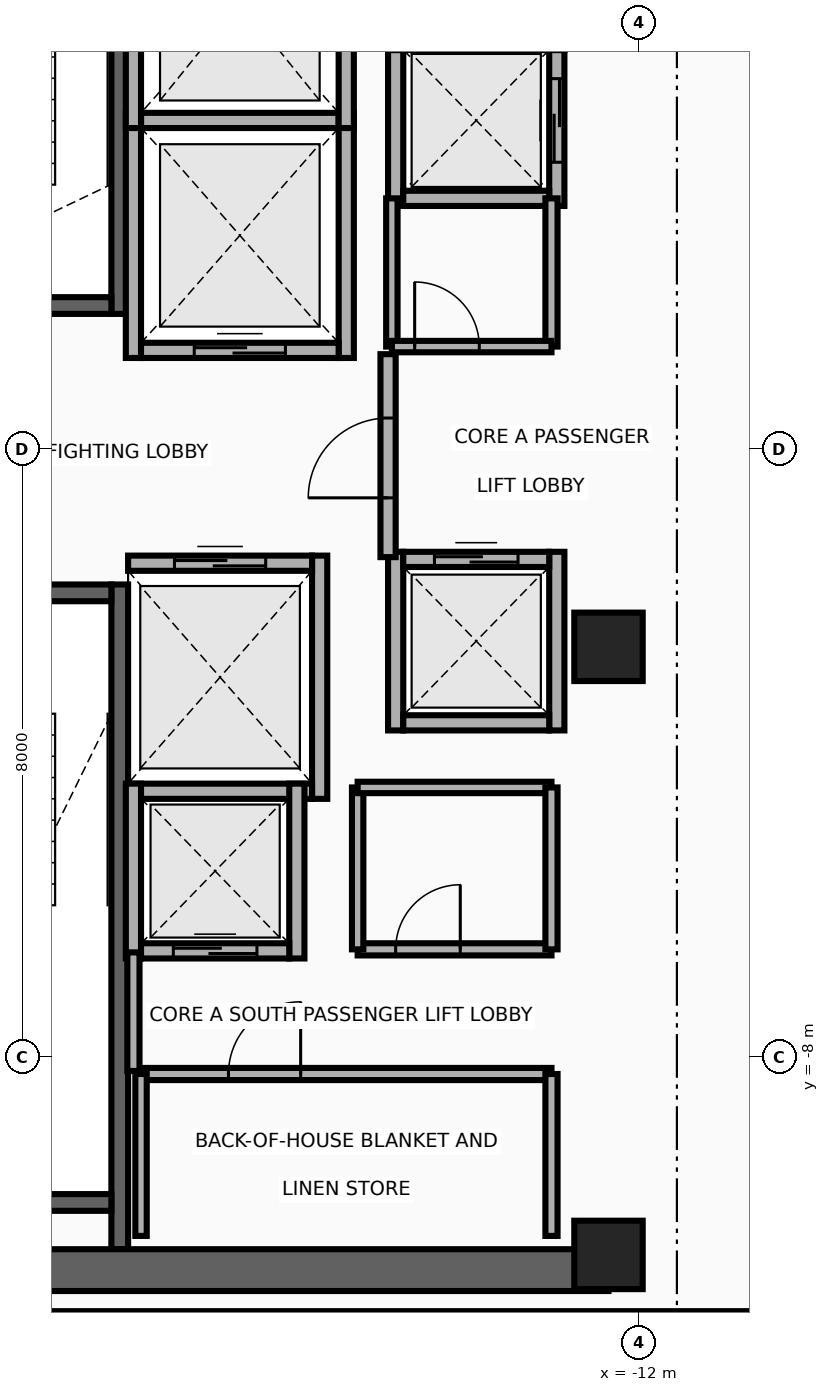
"""IFC4 building model, lengths in metres.
Left out: names, types, materials, properties, quantities, classifications, styles, units other than length and angle.
Written with IfcOpenShell. Run it as: python <this file> out.ifc"""

import sys

from ifc_helpers import new_model, si_unit, direction, frame, frame_2d, origin, origin_2d, place, context, subcontext, project, spatial, rectangle, extrude, source, transform, mapped, element, fill, save


model = new_model("IFC4")
c1 = context("Model", 3, precision=1e-05, world=origin(), true_north=direction((0.0, 1.0)))
c2 = subcontext(c1, "Body", "Model", "MODEL_VIEW")
j1 = project(units=[si_unit("LENGTHUNIT", "METRE"), si_unit("PLANEANGLEUNIT", "RADIAN")], contexts=[c1])
p1 = place(None, origin())
s1 = spatial("IfcSite", under=j1, at=p1, CompositionType="ELEMENT")
p2 = place(p1, origin())
s2 = spatial("IfcBuilding", under=s1, at=p2, CompositionType="ELEMENT")
p3 = place(p2, frame((0.0, 0.0, 233.5)))
s3 = spatial("IfcBuildingStorey", under=s2, at=p3, CompositionType="ELEMENT", Elevation=233.5)
p4 = place(p3, frame((-18.83, 1.78, 0.0), z_axis=(0.0, 0.0, 1.0), x_axis=(0.0, 1.0, 0.0)))
e1 = element("IfcWall", 1, at=p4, inside=s3, PredefinedType="SHEAR", context=c2, shape_type="SweptSolid", body=[
    extrude(rectangle(XDim=8.745, YDim=0.22, at=frame_2d((4.373, 0.0))), origin(), (0.0, 0.0, 1.0), 3.26),
])
p5 = place(p3, frame((-22.05, 1.89, 0.0), z_axis=(0.0, 0.0, 1.0), x_axis=(1.0, 0.0, 0.0)))
e2 = element("IfcWall", 2, at=p5, inside=s3, PredefinedType="SHEAR", context=c2, shape_type="SweptSolid", body=[
    extrude(rectangle(XDim=3.11, YDim=0.22, at=frame_2d((1.555, 0.0))), origin(), (0.0, 0.0, 1.0), 3.26),
])
p6 = place(p5, frame((1.0, 0.0, 0.0)))
e3 = element("IfcOpeningElement", 3, at=p6, cuts=e2, PredefinedType="OPENING", context=c2, shape_type="SweptSolid", body=[
    extrude(rectangle(XDim=1.1, YDim=2.15, at=frame_2d((0.55, 1.075))), frame((0.0, 0.125, 0.0), z_axis=(0.0, -1.0, 0.0), x_axis=(1.0, 0.0, 0.0)), (0.0, 0.0, 1.0), 0.25),
])
p7 = place(p3, frame((-18.83, -10.525, 0.0), z_axis=(0.0, 0.0, 1.0), x_axis=(0.0, 1.0, 0.0)))
e4 = element("IfcWall", 4, at=p7, inside=s3, PredefinedType="SHEAR", context=c2, shape_type="SweptSolid", body=[
    extrude(rectangle(XDim=8.745, YDim=0.22, at=frame_2d((4.373, 0.0))), origin(), (0.0, 0.0, 1.0), 3.26),
])
p8 = place(p3, frame((-22.05, -9.91, 0.0), z_axis=(0.0, 0.0, 1.0), x_axis=(1.0, 0.0, 0.0)))
e5 = element("IfcWall", 5, at=p8, inside=s3, PredefinedType="SHEAR", context=c2, shape_type="SweptSolid", body=[
    extrude(rectangle(XDim=3.11, YDim=0.22, at=frame_2d((1.555, 0.0))), origin(), (0.0, 0.0, 1.0), 3.26),
])
p9 = place(p3, frame((-22.05, -1.89, 0.0), z_axis=(0.0, 0.0, 1.0), x_axis=(1.0, 0.0, 0.0)))
e6 = element("IfcWall", 6, at=p9, inside=s3, PredefinedType="SHEAR", context=c2, shape_type="SweptSolid", body=[
    extrude(rectangle(XDim=3.11, YDim=0.22, at=frame_2d((1.555, 0.0))), origin(), (0.0, 0.0, 1.0), 3.26),
])
p10 = place(p9, frame((1.0, 0.0, 0.0)))
e7 = element("IfcOpeningElement", 7, at=p10, cuts=e6, PredefinedType="OPENING", context=c2, shape_type="SweptSolid", body=[
    extrude(rectangle(XDim=1.1, YDim=2.15, at=frame_2d((0.55, 1.075))), frame((0.0, 0.125, 0.0), z_axis=(0.0, -1.0, 0.0), x_axis=(1.0, 0.0, 0.0)), (0.0, 0.0, 1.0), 0.25),
])
p11 = place(p3, frame((-22.65, -10.8, 0.0), z_axis=(0.0, 0.0, 1.0), x_axis=(1.0, 0.0, 0.0)))
e8 = element("IfcWall", 8, at=p11, inside=s3, PredefinedType="SHEAR", context=c2, shape_type="SweptSolid", body=[
    extrude(rectangle(XDim=10.25, YDim=0.55, at=frame_2d((5.125, 0.0))), origin(), (0.0, 0.0, 1.0), 3.26),
])
m1 = source(origin(), c2, "Body", "SweptSolid", [
    extrude(rectangle(XDim=0.9, YDim=0.9, at=origin_2d()), origin(), (0.0, 0.0, 1.0), 3.5),
])
for number, where, z_axis, x_axis in (
    (9, (-12.4, -10.6, 0.0), (0.0, 0.0, 1.0), (1.0, 0.0, 0.0)),
    (10, (-12.4, -2.6, 0.0), (0.0, 0.0, 1.0), (1.0, 0.0, 0.0)),
):
    element("IfcColumn", number, at=place(p3, frame(where, z_axis=z_axis, x_axis=x_axis)), inside=s3, PredefinedType="COLUMN", context=c2, shape_type="MappedRepresentation", body=[
        mapped(m1, transform((0.0, 0.0, 0.0), x_axis=(1.0, 0.0, 0.0), y_axis=(0.0, 1.0, 0.0), z_axis=(0.0, 0.0, 1.0), scale=1.0)),
    ])
for number, where, z_axis, x_axis in (
    (11, (-18.65, 1.2, 0.0), (0.0, 0.0, 1.0), (0.0, 1.0, 0.0)),
    (12, (-15.85, 1.2, 0.0), (0.0, 0.0, 1.0), (0.0, 1.0, 0.0)),
):
    element("IfcWall", number, at=place(p3, frame(where, z_axis=z_axis, x_axis=x_axis)), inside=s3, PredefinedType="MOVABLE", context=c2, shape_type="SweptSolid", body=[
        extrude(rectangle(XDim=3.225, YDim=0.2, at=frame_2d((1.613, 0.0))), origin(), (0.0, 0.0, 1.0), 3.26),
    ])
p12 = place(p3, frame((-18.55, 1.3, 0.0), z_axis=(0.0, 0.0, 1.0), x_axis=(1.0, 0.0, 0.0)))
e13 = element("IfcWall", 13, at=p12, inside=s3, PredefinedType="MOVABLE", context=c2, shape_type="SweptSolid", body=[
    extrude(rectangle(XDim=2.6, YDim=0.2, at=frame_2d((1.3, 0.0))), origin(), (0.0, 0.0, 1.0), 3.26),
])
p13 = place(p12, frame((0.7, 0.0, 0.0)))
e14 = element("IfcOpeningElement", 14, at=p13, cuts=e13, PredefinedType="OPENING", context=c2, shape_type="SweptSolid", body=[
    extrude(rectangle(XDim=1.2, YDim=2.1, at=frame_2d((0.6, 1.05))), frame((0.0, 0.115, 0.0), z_axis=(0.0, -1.0, 0.0), x_axis=(1.0, 0.0, 0.0)), (0.0, 0.0, 1.0), 0.23),
])
p14 = place(p3, frame((-18.55, 4.325, 0.0), z_axis=(0.0, 0.0, 1.0), x_axis=(1.0, 0.0, 0.0)))
e15 = element("IfcWall", 15, at=p14, inside=s3, PredefinedType="MOVABLE", context=c2, shape_type="SweptSolid", body=[
    extrude(rectangle(XDim=2.6, YDim=0.2, at=frame_2d((1.3, 0.0))), origin(), (0.0, 0.0, 1.0), 3.26),
])
p15 = place(p3, frame((-16.2, -4.6, 0.0), z_axis=(0.0, 0.0, 1.0), x_axis=(0.0, 1.0, 0.0)))
e16 = element("IfcWall", 16, at=p15, inside=s3, PredefinedType="MOVABLE", context=c2, shape_type="SweptSolid", body=[
    extrude(rectangle(XDim=3.2, YDim=0.2, at=frame_2d((1.6, 0.0))), origin(), (0.0, 0.0, 1.0), 3.26),
])
p16 = place(p3, frame((-18.72, -4.5, 0.0), z_axis=(0.0, 0.0, 1.0), x_axis=(1.0, 0.0, 0.0)))
e17 = element("IfcWall", 17, at=p16, inside=s3, PredefinedType="MOVABLE", context=c2, shape_type="SweptSolid", body=[
    extrude(rectangle(XDim=2.42, YDim=0.2, at=frame_2d((1.21, 0.0))), origin(), (0.0, 0.0, 1.0), 3.26),
])
p17 = place(p3, frame((-18.72, -1.5, 0.0), z_axis=(0.0, 0.0, 1.0), x_axis=(1.0, 0.0, 0.0)))
e18 = element("IfcWall", 18, at=p17, inside=s3, PredefinedType="MOVABLE", context=c2, shape_type="SweptSolid", body=[
    extrude(rectangle(XDim=2.42, YDim=0.2, at=frame_2d((1.21, 0.0))), origin(), (0.0, 0.0, 1.0), 3.26),
])
p18 = place(p17, frame((0.61, 0.0, 0.0)))
e19 = element("IfcOpeningElement", 19, at=p18, cuts=e18, PredefinedType="OPENING", context=c2, shape_type="SweptSolid", body=[
    extrude(rectangle(XDim=1.2, YDim=2.1, at=frame_2d((0.6, 1.05))), frame((0.0, 0.115, 0.0), z_axis=(0.0, -1.0, 0.0), x_axis=(1.0, 0.0, 0.0)), (0.0, 0.0, 1.0), 0.23),
])
for number, where, z_axis, x_axis in (
    (20, (-18.65, 4.225, 0.0), (0.0, 0.0, 1.0), (0.0, 1.0, 0.0)),
    (21, (-15.85, 4.225, 0.0), (0.0, 0.0, 1.0), (0.0, 1.0, 0.0)),
):
    element("IfcWall", number, at=place(p3, frame(where, z_axis=z_axis, x_axis=x_axis)), inside=s3, PredefinedType="MOVABLE", context=c2, shape_type="SweptSolid", body=[
        extrude(rectangle(XDim=3.325, YDim=0.2, at=frame_2d((1.663, 0.0))), origin(), (0.0, 0.0, 1.0), 3.26),
    ])
p19 = place(p3, frame((-15.2, 3.2, 0.0), z_axis=(0.0, 0.0, 1.0), x_axis=(0.0, 1.0, 0.0)))
e22 = element("IfcWall", 22, at=p19, inside=s3, PredefinedType="MOVABLE", context=c2, shape_type="SweptSolid", body=[
    extrude(rectangle(XDim=2.25, YDim=0.2, at=frame_2d((1.125, 0.0))), origin(), (0.0, 0.0, 1.0), 3.26),
])
p20 = place(p3, frame((-13.08, 3.2, 0.0), z_axis=(0.0, 0.0, 1.0), x_axis=(0.0, 1.0, 0.0)))
e23 = element("IfcWall", 23, at=p20, inside=s3, PredefinedType="MOVABLE", context=c2, shape_type="SweptSolid", body=[
    extrude(rectangle(XDim=2.25, YDim=0.2, at=frame_2d((1.125, 0.0))), origin(), (0.0, 0.0, 1.0), 3.26),
])
p21 = place(p20, frame((0.575, 0.0, 0.0)))
e24 = element("IfcOpeningElement", 24, at=p21, cuts=e23, PredefinedType="OPENING", context=c2, shape_type="SweptSolid", body=[
    extrude(rectangle(XDim=1.1, YDim=2.1, at=frame_2d((0.55, 1.05))), frame((0.0, 0.115, 0.0), z_axis=(0.0, -1.0, 0.0), x_axis=(1.0, 0.0, 0.0)), (0.0, 0.0, 1.0), 0.23),
])
p22 = place(p3, frame((-15.1, 3.3, 0.0), z_axis=(0.0, 0.0, 1.0), x_axis=(1.0, 0.0, 0.0)))
e25 = element("IfcWall", 25, at=p22, inside=s3, PredefinedType="MOVABLE", context=c2, shape_type="SweptSolid", body=[
    extrude(rectangle(XDim=1.92, YDim=0.2, at=frame_2d((0.96, 0.0))), origin(), (0.0, 0.0, 1.0), 3.26),
])
for number, where, z_axis, x_axis in (
    (26, (-18.65, -6.7, 0.0), (0.0, 0.0, 1.0), (0.0, 1.0, 0.0)),
    (27, (-16.5, -6.7, 0.0), (0.0, 0.0, 1.0), (0.0, 1.0, 0.0)),
):
    element("IfcWall", number, at=place(p3, frame(where, z_axis=z_axis, x_axis=x_axis)), inside=s3, PredefinedType="MOVABLE", context=c2, shape_type="SweptSolid", body=[
        extrude(rectangle(XDim=2.3, YDim=0.2, at=frame_2d((1.15, 0.0))), origin(), (0.0, 0.0, 1.0), 3.26),
    ])
p23 = place(p3, frame((-18.55, -6.6, 0.0), z_axis=(0.0, 0.0, 1.0), x_axis=(1.0, 0.0, 0.0)))
e28 = element("IfcWall", 28, at=p23, inside=s3, PredefinedType="MOVABLE", context=c2, shape_type="SweptSolid", body=[
    extrude(rectangle(XDim=1.95, YDim=0.2, at=frame_2d((0.975, 0.0))), origin(), (0.0, 0.0, 1.0), 3.26),
])
p24 = place(p23, frame((0.425, 0.0, 0.0)))
e29 = element("IfcOpeningElement", 29, at=p24, cuts=e28, PredefinedType="OPENING", context=c2, shape_type="SweptSolid", body=[
    extrude(rectangle(XDim=1.1, YDim=2.1, at=frame_2d((0.55, 1.05))), frame((0.0, 0.115, 0.0), z_axis=(0.0, -1.0, 0.0), x_axis=(1.0, 0.0, 0.0)), (0.0, 0.0, 1.0), 0.23),
])
for number, where, z_axis, x_axis in (
    (30, (-15.2, -3.7, 0.0), (0.0, 0.0, 1.0), (0.0, 1.0, 0.0)),
    (31, (-13.08, -3.7, 0.0), (0.0, 0.0, 1.0), (0.0, 1.0, 0.0)),
):
    element("IfcWall", number, at=place(p3, frame(where, z_axis=z_axis, x_axis=x_axis)), inside=s3, PredefinedType="MOVABLE", context=c2, shape_type="SweptSolid", body=[
        extrude(rectangle(XDim=2.35, YDim=0.2, at=frame_2d((1.175, 0.0))), origin(), (0.0, 0.0, 1.0), 3.26),
    ])
p25 = place(p3, frame((-15.1, -3.6, 0.0), z_axis=(0.0, 0.0, 1.0), x_axis=(1.0, 0.0, 0.0)))
e32 = element("IfcWall", 32, at=p25, inside=s3, PredefinedType="MOVABLE", context=c2, shape_type="SweptSolid", body=[
    extrude(rectangle(XDim=1.92, YDim=0.2, at=frame_2d((0.96, 0.0))), origin(), (0.0, 0.0, 1.0), 3.26),
])
p26 = place(p3, frame((-15.1, -1.45, 0.0), z_axis=(0.0, 0.0, 1.0), x_axis=(1.0, 0.0, 0.0)))
e33 = element("IfcWall", 33, at=p26, inside=s3, PredefinedType="MOVABLE", context=c2, shape_type="SweptSolid", body=[
    extrude(rectangle(XDim=1.92, YDim=0.2, at=frame_2d((0.96, 0.0))), origin(), (0.0, 0.0, 1.0), 3.26),
])
p27 = place(p26, frame((0.41, 0.0, 0.0)))
e34 = element("IfcOpeningElement", 34, at=p27, cuts=e33, PredefinedType="OPENING", context=c2, shape_type="SweptSolid", body=[
    extrude(rectangle(XDim=1.1, YDim=2.1, at=frame_2d((0.55, 1.05))), frame((0.0, 0.115, 0.0), z_axis=(0.0, -1.0, 0.0), x_axis=(1.0, 0.0, 0.0)), (0.0, 0.0, 1.0), 0.23),
])
p28 = place(p3, frame((-15.3, -1.42, 0.0), z_axis=(0.0, 0.0, 1.0), x_axis=(0.0, 1.0, 0.0)))
e35 = element("IfcWall", 35, at=p28, inside=s3, PredefinedType="PARTITIONING", context=c2, shape_type="SweptSolid", body=[
    extrude(rectangle(XDim=2.67, YDim=0.2, at=frame_2d((1.335, 0.0))), origin(), (0.0, 0.0, 1.0), 3.26),
])
p29 = place(p28, frame((0.78, 0.0, 0.0)))
e36 = element("IfcOpeningElement", 36, at=p29, cuts=e35, PredefinedType="OPENING", context=c2, shape_type="SweptSolid", body=[
    extrude(rectangle(XDim=1.05, YDim=2.15, at=frame_2d((0.525, 1.075))), frame((0.0, 0.115, 0.0), z_axis=(0.0, -1.0, 0.0), x_axis=(1.0, 0.0, 0.0)), (0.0, 0.0, 1.0), 0.23),
])
p30 = place(p3, frame((-18.65, -8.18, 0.0), z_axis=(0.0, 0.0, 1.0), x_axis=(0.0, 1.0, 0.0)))
e37 = element("IfcWall", 37, at=p30, inside=s3, PredefinedType="PARTITIONING", context=c2, shape_type="SweptSolid", body=[
    extrude(rectangle(XDim=1.56, YDim=0.16, at=frame_2d((0.78, 0.0))), origin(), (0.0, 0.0, 1.0), 3.26),
])
p31 = place(p3, frame((-18.55, -8.22, 0.0), z_axis=(0.0, 0.0, 1.0), x_axis=(1.0, 0.0, 0.0)))
e38 = element("IfcWall", 38, at=p31, inside=s3, PredefinedType="PARTITIONING", context=c2, shape_type="SweptSolid", body=[
    extrude(rectangle(XDim=5.4, YDim=0.16, at=frame_2d((2.7, 0.0))), origin(), (0.0, 0.0, 1.0), 3.26),
])
p32 = place(p31, frame((1.15, 0.0, 0.0)))
e39 = element("IfcOpeningElement", 39, at=p32, cuts=e38, PredefinedType="OPENING", context=c2, shape_type="SweptSolid", body=[
    extrude(rectangle(XDim=0.95, YDim=2.15, at=frame_2d((0.475, 1.075))), frame((0.0, 0.095, 0.0), z_axis=(0.0, -1.0, 0.0), x_axis=(1.0, 0.0, 0.0)), (0.0, 0.0, 1.0), 0.19),
])
p33 = place(p3, frame((-18.55, -10.35, 0.0), z_axis=(0.0, 0.0, 1.0), x_axis=(0.0, 1.0, 0.0)))
e40 = element("IfcWall", 40, at=p33, inside=s3, PredefinedType="PARTITIONING", context=c2, shape_type="SweptSolid", body=[
    extrude(rectangle(XDim=2.13, YDim=0.15, at=frame_2d((1.065, 0.0))), origin(), (0.0, 0.0, 1.0), 3.26),
])
p34 = place(p3, frame((-13.15, -10.35, 0.0), z_axis=(0.0, 0.0, 1.0), x_axis=(0.0, 1.0, 0.0)))
e41 = element("IfcWall", 41, at=p34, inside=s3, PredefinedType="PARTITIONING", context=c2, shape_type="SweptSolid", body=[
    extrude(rectangle(XDim=2.13, YDim=0.16, at=frame_2d((1.065, 0.0))), origin(), (0.0, 0.0, 1.0), 3.26),
])
p35 = place(p3, frame((-15.7, -6.58, 0.0), z_axis=(0.0, 0.0, 1.0), x_axis=(1.0, 0.0, 0.0)))
e42 = element("IfcWall", 42, at=p35, inside=s3, PredefinedType="PARTITIONING", context=c2, shape_type="SweptSolid", body=[
    extrude(rectangle(XDim=2.55, YDim=0.16, at=frame_2d((1.275, 0.0))), origin(), (0.0, 0.0, 1.0), 3.26),
])
p36 = place(p35, frame((0.5, 0.0, 0.0)))
e43 = element("IfcOpeningElement", 43, at=p36, cuts=e42, PredefinedType="OPENING", context=c2, shape_type="SweptSolid", body=[
    extrude(rectangle(XDim=0.85, YDim=2.05, at=frame_2d((0.425, 1.025))), frame((0.0, 0.095, 0.0), z_axis=(0.0, -1.0, 0.0), x_axis=(1.0, 0.0, 0.0)), (0.0, 0.0, 1.0), 0.19),
])
p37 = place(p3, frame((-15.7, -6.58, 0.0), z_axis=(0.0, 0.0, 1.0), x_axis=(0.0, 1.0, 0.0)))
e44 = element("IfcWall", 44, at=p37, inside=s3, PredefinedType="PARTITIONING", context=c2, shape_type="SweptSolid", body=[
    extrude(rectangle(XDim=2.13, YDim=0.15, at=frame_2d((1.065, 0.0))), origin(), (0.0, 0.0, 1.0), 3.26),
])
p38 = place(p3, frame((-15.7, -4.45, 0.0), z_axis=(0.0, 0.0, 1.0), x_axis=(1.0, 0.0, 0.0)))
e45 = element("IfcWall", 45, at=p38, inside=s3, PredefinedType="PARTITIONING", context=c2, shape_type="SweptSolid", body=[
    extrude(rectangle(XDim=2.55, YDim=0.15, at=frame_2d((1.275, 0.0))), origin(), (0.0, 0.0, 1.0), 3.26),
])
p39 = place(p3, frame((-13.15, -6.58, 0.0), z_axis=(0.0, 0.0, 1.0), x_axis=(0.0, 1.0, 0.0)))
e46 = element("IfcWall", 46, at=p39, inside=s3, PredefinedType="PARTITIONING", context=c2, shape_type="SweptSolid", body=[
    extrude(rectangle(XDim=2.13, YDim=0.16, at=frame_2d((1.065, 0.0))), origin(), (0.0, 0.0, 1.0), 3.26),
])
p40 = place(p3, frame((-13.15, 1.35, 0.0), z_axis=(0.0, 0.0, 1.0), x_axis=(0.0, 1.0, 0.0)))
e47 = element("IfcWall", 47, at=p40, inside=s3, PredefinedType="PARTITIONING", context=c2, shape_type="SweptSolid", body=[
    extrude(rectangle(XDim=1.95, YDim=0.16, at=frame_2d((0.975, 0.0))), origin(), (0.0, 0.0, 1.0), 3.26),
])
p41 = place(p3, frame((-15.25, 1.35, 0.0), z_axis=(0.0, 0.0, 1.0), x_axis=(0.0, 1.0, 0.0)))
e48 = element("IfcWall", 48, at=p41, inside=s3, PredefinedType="PARTITIONING", context=c2, shape_type="SweptSolid", body=[
    extrude(rectangle(XDim=1.95, YDim=0.15, at=frame_2d((0.975, 0.0))), origin(), (0.0, 0.0, 1.0), 3.26),
])
p42 = place(p3, frame((-15.25, 1.35, 0.0), z_axis=(0.0, 0.0, 1.0), x_axis=(1.0, 0.0, 0.0)))
e49 = element("IfcWall", 49, at=p42, inside=s3, PredefinedType="PARTITIONING", context=c2, shape_type="SweptSolid", body=[
    extrude(rectangle(XDim=2.1, YDim=0.15, at=frame_2d((1.05, 0.0))), origin(), (0.0, 0.0, 1.0), 3.26),
])
p43 = place(p42, frame((0.3, 0.0, 0.0)))
e50 = element("IfcOpeningElement", 50, at=p43, cuts=e49, PredefinedType="OPENING", context=c2, shape_type="SweptSolid", body=[
    extrude(rectangle(XDim=0.85, YDim=2.05, at=frame_2d((0.425, 1.025))), frame((0.0, 0.09, 0.0), z_axis=(0.0, -1.0, 0.0), x_axis=(1.0, 0.0, 0.0)), (0.0, 0.0, 1.0), 0.18),
])
p44 = place(p3, frame((-23.45, -11.42, 0.0), z_axis=(0.0, 0.0, 1.0), x_axis=(1.0, 0.0, 0.0)))
e51 = element("IfcWall", 51, at=p44, inside=s3, PredefinedType="PARTITIONING", context=c2, shape_type="SweptSolid", body=[
    extrude(rectangle(XDim=13.84, YDim=0.16, at=frame_2d((6.92, 0.0))), origin(), (0.0, 0.0, 1.0), 2.634),
])
p45 = place(p13, origin())
e52 = element("IfcDoor", 52, at=p45, inside=s3, OperationType="DOUBLE_DOOR_SLIDING", PredefinedType="DOOR", context=c2, shape_type="SweptSolid", body=[
    extrude(rectangle(XDim=1.2, YDim=2.1, at=frame_2d((0.6, 1.05))), frame((0.0, 0.025, 0.0), z_axis=(0.0, -1.0, 0.0), x_axis=(1.0, 0.0, 0.0)), (0.0, 0.0, 1.0), 0.05),
])
fill(e14, e52)
p46 = place(p18, origin())
e53 = element("IfcDoor", 53, at=p46, inside=s3, OperationType="DOUBLE_DOOR_SLIDING", PredefinedType="DOOR", context=c2, shape_type="SweptSolid", body=[
    extrude(rectangle(XDim=1.2, YDim=2.1, at=frame_2d((0.6, 1.05))), frame((0.0, 0.025, 0.0), z_axis=(0.0, -1.0, 0.0), x_axis=(1.0, 0.0, 0.0)), (0.0, 0.0, 1.0), 0.05),
])
fill(e19, e53)
p47 = place(p21, origin())
e54 = element("IfcDoor", 54, at=p47, inside=s3, OperationType="DOUBLE_DOOR_SLIDING", PredefinedType="DOOR", context=c2, shape_type="SweptSolid", body=[
    extrude(rectangle(XDim=1.1, YDim=2.1, at=frame_2d((0.55, 1.05))), frame((0.0, 0.025, 0.0), z_axis=(0.0, -1.0, 0.0), x_axis=(1.0, 0.0, 0.0)), (0.0, 0.0, 1.0), 0.05),
])
fill(e24, e54)
p48 = place(p24, origin())
e55 = element("IfcDoor", 55, at=p48, inside=s3, OperationType="DOUBLE_DOOR_SLIDING", PredefinedType="DOOR", context=c2, shape_type="SweptSolid", body=[
    extrude(rectangle(XDim=1.1, YDim=2.1, at=frame_2d((0.55, 1.05))), frame((0.0, 0.025, 0.0), z_axis=(0.0, -1.0, 0.0), x_axis=(1.0, 0.0, 0.0)), (0.0, 0.0, 1.0), 0.05),
])
fill(e29, e55)
p49 = place(p27, origin())
e56 = element("IfcDoor", 56, at=p49, inside=s3, OperationType="DOUBLE_DOOR_SLIDING", PredefinedType="DOOR", context=c2, shape_type="SweptSolid", body=[
    extrude(rectangle(XDim=1.1, YDim=2.1, at=frame_2d((0.55, 1.05))), frame((0.0, 0.025, 0.0), z_axis=(0.0, -1.0, 0.0), x_axis=(1.0, 0.0, 0.0)), (0.0, 0.0, 1.0), 0.05),
])
fill(e34, e56)
p50 = place(p29, origin())
e57 = element("IfcDoor", 57, at=p50, inside=s3, OperationType="SINGLE_SWING_RIGHT", PredefinedType="DOOR", context=c2, shape_type="SweptSolid", body=[
    extrude(rectangle(XDim=1.05, YDim=2.15, at=frame_2d((0.525, 1.075))), frame((0.0, 0.025, 0.0), z_axis=(0.0, -1.0, 0.0), x_axis=(1.0, 0.0, 0.0)), (0.0, 0.0, 1.0), 0.05),
])
fill(e36, e57)
p51 = place(p32, origin())
e58 = element("IfcDoor", 58, at=p51, inside=s3, OperationType="SINGLE_SWING_LEFT", PredefinedType="DOOR", context=c2, shape_type="SweptSolid", body=[
    extrude(rectangle(XDim=0.95, YDim=2.15, at=frame_2d((0.475, 1.075))), frame((0.0, 0.025, 0.0), z_axis=(0.0, -1.0, 0.0), x_axis=(1.0, 0.0, 0.0)), (0.0, 0.0, 1.0), 0.05),
])
fill(e39, e58)
p52 = place(p36, origin())
e59 = element("IfcDoor", 59, at=p52, inside=s3, OperationType="SINGLE_SWING_RIGHT", PredefinedType="DOOR", context=c2, shape_type="SweptSolid", body=[
    extrude(rectangle(XDim=0.85, YDim=2.05, at=frame_2d((0.425, 1.025))), frame((0.0, 0.025, 0.0), z_axis=(0.0, -1.0, 0.0), x_axis=(1.0, 0.0, 0.0)), (0.0, 0.0, 1.0), 0.05),
])
fill(e43, e59)
p53 = place(p43, origin())
e60 = element("IfcDoor", 60, at=p53, inside=s3, OperationType="SINGLE_SWING_LEFT", PredefinedType="DOOR", context=c2, shape_type="SweptSolid", body=[
    extrude(rectangle(XDim=0.85, YDim=2.05, at=frame_2d((0.425, 1.025))), frame((0.0, 0.025, 0.0), z_axis=(0.0, -1.0, 0.0), x_axis=(1.0, 0.0, 0.0)), (0.0, 0.0, 1.0), 0.05),
])
fill(e50, e60)
save(model, sys.argv[1])
